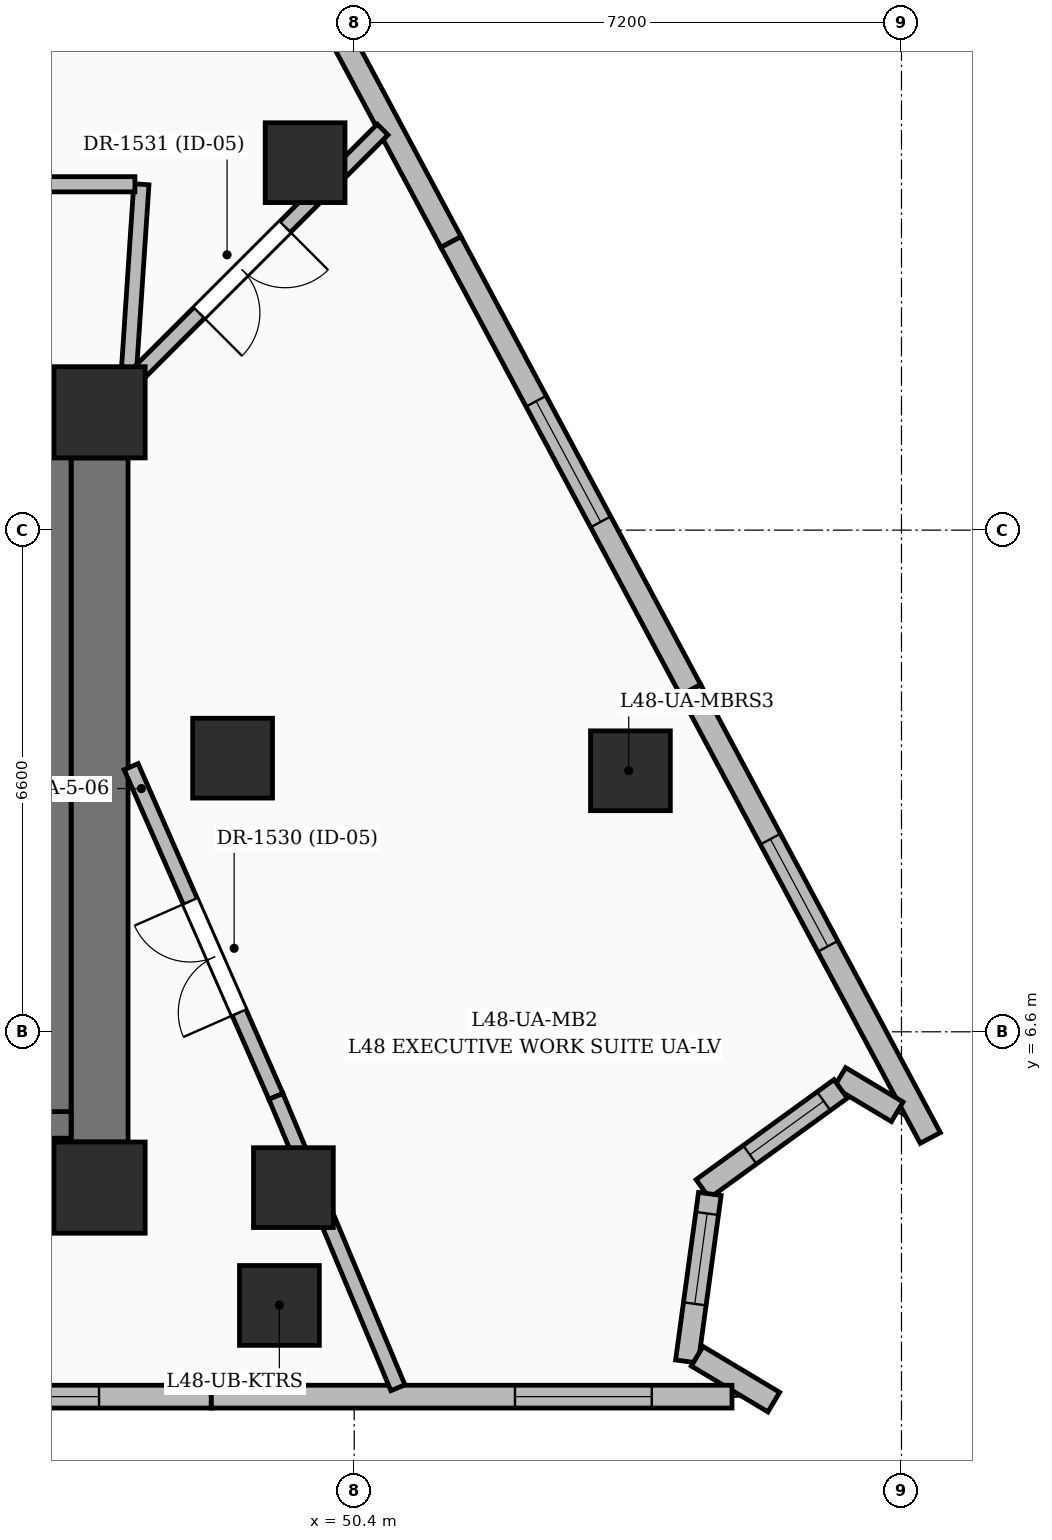
"""IFC4 building model, lengths in metres.
Left out: names, types, materials, properties, quantities, classifications, styles, units other than length and angle.
Written with IfcOpenShell. Run it as: python <this file> out.ifc"""

import sys

from ifc_helpers import new_model, si_unit, direction, frame, frame_2d, origin, origin_2d, place, context, subcontext, project, spatial, rectangle, extrude, element, fill, save


model = new_model("IFC4")
c1 = context("Model", 3, precision=1e-05, world=origin(), true_north=direction((0.0, 1.0)))
c2 = subcontext(c1, "Body", "Model", "MODEL_VIEW")
j1 = project(units=[si_unit("LENGTHUNIT", "METRE"), si_unit("PLANEANGLEUNIT", "RADIAN")], contexts=[c1])
p1 = place(None, origin())
s1 = spatial("IfcSite", under=j1, at=p1, CompositionType="ELEMENT")
p2 = place(p1, origin())
s2 = spatial("IfcBuilding", under=s1, at=p2, CompositionType="ELEMENT")
p3 = place(p2, frame((0.0, 0.0, 186.0)))
s3 = spatial("IfcBuildingStorey", under=s2, at=p3, CompositionType="ELEMENT", Elevation=186.0)
for number, where, z_axis, x_axis in (
    (1, (47.05, 4.55, 0.0), (0.0, 0.0, 1.0), (1.0, 0.0, 0.0)),
    (2, (47.05, 14.75, 0.0), (0.0, 0.0, 1.0), (1.0, 0.0, 0.0)),
):
    element("IfcColumn", number, at=place(p3, frame(where, z_axis=z_axis, x_axis=x_axis)), inside=s3, PredefinedType="COLUMN", context=c2, shape_type="SweptSolid", body=[
        extrude(rectangle(XDim=1.2, YDim=1.2, at=origin_2d()), origin(), (0.0, 0.0, 1.0), 3.6),
    ])
for number, where, z_axis, x_axis in (
    (3, (49.6, 4.55, 0.0), (0.0, 0.0, 1.0), (1.0, 0.0, 0.0)),
    (4, (48.8, 10.2, 0.0), (0.0, 0.0, 1.0), (1.0, 0.0, 0.0)),
):
    element("IfcColumn", number, at=place(p3, frame(where, z_axis=z_axis, x_axis=x_axis)), inside=s3, PredefinedType="COLUMN", context=c2, shape_type="SweptSolid", body=[
        extrude(rectangle(XDim=1.05, YDim=1.05, at=origin_2d()), origin(), (0.0, 0.0, 1.0), 3.6),
    ])
p4 = place(p3, frame((35.75, 4.55, 0.0), z_axis=(0.0, 0.0, 1.0), x_axis=(1.0, 0.0, 0.0)))
e5 = element("IfcWall", 5, at=p4, inside=s3, PredefinedType="SHEAR", context=c2, shape_type="SweptSolid", body=[
    extrude(rectangle(XDim=10.7, YDim=0.75, at=frame_2d((5.35, 0.0))), origin(), (0.0, 0.0, 1.0), 3.6),
])
p5 = place(p3, frame((35.75, 14.75, 0.0), z_axis=(0.0, 0.0, 1.0), x_axis=(1.0, 0.0, 0.0)))
e6 = element("IfcWall", 6, at=p5, inside=s3, PredefinedType="SHEAR", context=c2, shape_type="SweptSolid", body=[
    extrude(rectangle(XDim=10.7, YDim=0.75, at=frame_2d((5.35, 0.0))), origin(), (0.0, 0.0, 1.0), 3.6),
])
p6 = place(p5, frame((1.025, 0.0, 0.0)))
e7 = element("IfcOpeningElement", 7, at=p6, cuts=e6, PredefinedType="OPENING", context=c2, shape_type="SweptSolid", body=[
    extrude(rectangle(XDim=1.05, YDim=2.15, at=frame_2d((0.525, 1.075))), frame((0.0, 0.385, 0.0), z_axis=(0.0, -1.0, 0.0), x_axis=(1.0, 0.0, 0.0)), (0.0, 0.0, 1.0), 0.77),
])
p7 = place(p5, frame((8.625, 0.0, 0.0)))
e8 = element("IfcOpeningElement", 8, at=p7, cuts=e6, PredefinedType="OPENING", context=c2, shape_type="SweptSolid", body=[
    extrude(rectangle(XDim=1.05, YDim=2.15, at=frame_2d((0.525, 1.075))), frame((0.0, 0.385, 0.0), z_axis=(0.0, -1.0, 0.0), x_axis=(1.0, 0.0, 0.0)), (0.0, 0.0, 1.0), 0.77),
])
p8 = place(p3, frame((47.05, 5.15, 0.0), z_axis=(0.0, 0.0, 1.0), x_axis=(0.0, 1.0, 0.0)))
e9 = element("IfcWall", 9, at=p8, inside=s3, PredefinedType="SHEAR", context=c2, shape_type="SweptSolid", body=[
    extrude(rectangle(XDim=9.0, YDim=0.75, at=frame_2d((4.5, 0.0))), origin(), (0.0, 0.0, 1.0), 3.6),
])
p9 = place(p3, frame((46.5, 5.2, 0.0), z_axis=(0.0, 0.0, 1.0), x_axis=(0.0, 1.0, 0.0)))
e10 = element("IfcWall", 10, at=p9, inside=s3, PredefinedType="SOLIDWALL", context=c2, shape_type="SweptSolid", body=[
    extrude(rectangle(XDim=9.175, YDim=0.35, at=frame_2d((4.587, 0.0))), origin(), (0.0, 0.0, 1.0), 3.6),
])
p10 = place(p3, frame((43.125, 5.375, 0.0), z_axis=(0.0, 0.0, 1.0), x_axis=(1.0, 0.0, 0.0)))
e11 = element("IfcWall", 11, at=p10, inside=s3, PredefinedType="SOLIDWALL", context=c2, shape_type="SweptSolid", body=[
    extrude(rectangle(XDim=3.55, YDim=0.35, at=frame_2d((1.775, 0.0))), origin(), (0.0, 0.0, 1.0), 3.6),
])
for number, where, z_axis, x_axis in (
    (12, (49.416, 3.0, 0.0), (0.0, 0.0, 1.0), (1.0, 0.0, 0.0)),
    (13, (54.034, 10.034, 0.0), (0.0, 0.0, 1.0), (1.0, 0.0, 0.0)),
    (14, (49.754, 18.034, 0.0), (0.0, 0.0, 1.0), (1.0, 0.0, 0.0)),
):
    element("IfcColumn", number, at=place(p3, frame(where, z_axis=z_axis, x_axis=x_axis)), inside=s3, PredefinedType="COLUMN", context=c2, shape_type="SweptSolid", body=[
        extrude(rectangle(XDim=1.05, YDim=1.05, at=origin_2d()), origin(), (0.0, 0.0, 1.0), 3.6),
    ])
p11 = place(p3, frame((48.652, 22.636, 0.0), z_axis=(0.0, 0.0, 1.0), x_axis=(0.471747381443, -0.881733751254, 0.0)))
e15 = element("IfcWall", 15, at=p11, inside=s3, PredefinedType="SOLIDWALL", context=c2, shape_type="SweptSolid", body=[
    extrude(rectangle(XDim=6.404, YDim=0.3, at=frame_2d((3.202, 0.0))), origin(), (0.0, 0.0, 1.0), 3.35),
])
p12 = place(p11, frame((1.32, 0.0, 0.55)))
e16 = element("IfcOpeningElement", 16, at=p12, cuts=e15, PredefinedType="OPENING", context=c2, shape_type="SweptSolid", body=[
    extrude(rectangle(XDim=2.1, YDim=2.4, at=frame_2d((1.05, 1.2))), frame((0.0, 0.16, 0.0), z_axis=(0.0, -1.0, 0.0), x_axis=(1.0, 0.0, 0.0)), (0.0, 0.0, 1.0), 0.32),
])
p13 = place(p3, frame((51.673, 16.99, 0.0), z_axis=(0.0, 0.0, 1.0), x_axis=(0.471736796599, -0.881739414303, 0.0)))
e17 = element("IfcWall", 17, at=p13, inside=s3, PredefinedType="SOLIDWALL", context=c2, shape_type="SweptSolid", body=[
    extrude(rectangle(XDim=6.683, YDim=0.3, at=frame_2d((3.342, 0.0))), origin(), (0.0, 0.0, 1.0), 3.35),
])
p14 = place(p13, frame((2.375, 0.0, 0.6)))
e18 = element("IfcOpeningElement", 18, at=p14, cuts=e17, PredefinedType="OPENING", context=c2, shape_type="SweptSolid", body=[
    extrude(rectangle(XDim=1.8, YDim=2.1, at=frame_2d((0.9, 1.05))), frame((0.0, 0.16, 0.0), z_axis=(0.0, -1.0, 0.0), x_axis=(1.0, 0.0, 0.0)), (0.0, 0.0, 1.0), 0.32),
])
p15 = place(p3, frame((54.826, 11.097, 0.0), z_axis=(0.0, 0.0, 1.0), x_axis=(0.471750001728, -0.881732349338, 0.0)))
e19 = element("IfcWall", 19, at=p15, inside=s3, PredefinedType="SOLIDWALL", context=c2, shape_type="SweptSolid", body=[
    extrude(rectangle(XDim=6.684, YDim=0.3, at=frame_2d((3.342, 0.0))), origin(), (0.0, 0.0, 1.0), 3.35),
])
p16 = place(p15, frame((2.225, 0.0, 0.55)))
e20 = element("IfcOpeningElement", 20, at=p16, cuts=e19, PredefinedType="OPENING", context=c2, shape_type="SweptSolid", body=[
    extrude(rectangle(XDim=1.6, YDim=2.2, at=frame_2d((0.8, 1.1))), frame((0.0, 0.16, 0.0), z_axis=(0.0, -1.0, 0.0), x_axis=(1.0, 0.0, 0.0)), (0.0, 0.0, 1.0), 0.32),
])
p17 = place(p3, frame((57.544, 5.548, 0.0), z_axis=(0.0, 0.0, 1.0), x_axis=(-0.857957606383, 0.513720493702, 0.0)))
e21 = element("IfcWall", 21, at=p17, inside=s3, PredefinedType="SOLIDWALL", context=c2, shape_type="SweptSolid", body=[
    extrude(rectangle(XDim=0.88, YDim=0.3, at=frame_2d((0.44, 0.0))), origin(), (0.0, 0.0, 1.0), 3.35),
])
p18 = place(p3, frame((56.8, 5.849, 0.0), z_axis=(0.0, 0.0, 1.0), x_axis=(-0.809635036496, -0.586933648446, 0.0)))
e22 = element("IfcWall", 22, at=p18, inside=s3, PredefinedType="SOLIDWALL", context=c2, shape_type="SweptSolid", body=[
    extrude(rectangle(XDim=2.241, YDim=0.3, at=frame_2d((1.12, 0.0))), origin(), (0.0, 0.0, 1.0), 3.35),
])
p19 = place(p18, frame((0.275, 0.0, 0.8)))
e23 = element("IfcOpeningElement", 23, at=p19, cuts=e22, PredefinedType="OPENING", context=c2, shape_type="SweptSolid", body=[
    extrude(rectangle(XDim=1.2, YDim=1.8, at=frame_2d((0.6, 0.9))), frame((0.0, 0.16, 0.0), z_axis=(0.0, -1.0, 0.0), x_axis=(1.0, 0.0, 0.0)), (0.0, 0.0, 1.0), 0.32),
])
p20 = place(p3, frame((55.079, 4.467, 0.0), z_axis=(0.0, 0.0, 1.0), x_axis=(-0.135475439613, -0.99078070493, 0.0)))
e24 = element("IfcWall", 24, at=p20, inside=s3, PredefinedType="SOLIDWALL", context=c2, shape_type="SweptSolid", body=[
    extrude(rectangle(XDim=2.226, YDim=0.3, at=frame_2d((1.113, 0.0))), origin(), (0.0, 0.0, 1.0), 3.35),
])
p21 = place(p20, frame((0.26, 0.0, 0.8)))
e25 = element("IfcOpeningElement", 25, at=p21, cuts=e24, PredefinedType="OPENING", context=c2, shape_type="SweptSolid", body=[
    extrude(rectangle(XDim=1.2, YDim=1.8, at=frame_2d((0.6, 0.9))), frame((0.0, 0.16, 0.0), z_axis=(0.0, -1.0, 0.0), x_axis=(1.0, 0.0, 0.0)), (0.0, 0.0, 1.0), 0.32),
])
p22 = place(p3, frame((54.912, 2.332, 0.0), z_axis=(0.0, 0.0, 1.0), x_axis=(0.857950827386, -0.513731815043, 0.0)))
e26 = element("IfcWall", 26, at=p22, inside=s3, PredefinedType="SOLIDWALL", context=c2, shape_type="SweptSolid", body=[
    extrude(rectangle(XDim=1.175, YDim=0.3, at=frame_2d((0.588, 0.0))), origin(), (0.0, 0.0, 1.0), 3.35),
])
p23 = place(p3, frame((55.37, 1.8, 0.0), z_axis=(0.0, 0.0, 1.0), x_axis=(-1.0, 0.0, 0.0)))
e27 = element("IfcWall", 27, at=p23, inside=s3, PredefinedType="SOLIDWALL", context=c2, shape_type="SweptSolid", body=[
    extrude(rectangle(XDim=6.852, YDim=0.3, at=frame_2d((3.426, 0.0))), origin(), (0.0, 0.0, 1.0), 3.35),
])
p24 = place(p23, frame((1.055, 0.0, 0.6)))
e28 = element("IfcOpeningElement", 28, at=p24, cuts=e27, PredefinedType="OPENING", context=c2, shape_type="SweptSolid", body=[
    extrude(rectangle(XDim=1.8, YDim=2.1, at=frame_2d((0.9, 1.05))), frame((0.0, 0.16, 0.0), z_axis=(0.0, -1.0, 0.0), x_axis=(1.0, 0.0, 0.0)), (0.0, 0.0, 1.0), 0.32),
])
p25 = place(p3, frame((48.518, 1.8, 0.0), z_axis=(0.0, 0.0, 1.0), x_axis=(-1.0, 0.0, 0.0)))
e29 = element("IfcWall", 29, at=p25, inside=s3, PredefinedType="SOLIDWALL", context=c2, shape_type="SweptSolid", body=[
    extrude(rectangle(XDim=7.422, YDim=0.3, at=frame_2d((3.711, 0.0))), origin(), (0.0, 0.0, 1.0), 3.35),
])
p26 = place(p25, frame((4.85, 0.0, 0.55)))
e30 = element("IfcOpeningElement", 30, at=p26, cuts=e29, PredefinedType="OPENING", context=c2, shape_type="SweptSolid", body=[
    extrude(rectangle(XDim=1.6, YDim=2.2, at=frame_2d((0.8, 1.1))), frame((0.0, 0.16, 0.0), z_axis=(0.0, -1.0, 0.0), x_axis=(1.0, 0.0, 0.0)), (0.0, 0.0, 1.0), 0.32),
])
p27 = place(p25, frame((1.475, 0.0, 0.55)))
e31 = element("IfcOpeningElement", 31, at=p27, cuts=e29, PredefinedType="OPENING", context=c2, shape_type="SweptSolid", body=[
    extrude(rectangle(XDim=1.6, YDim=2.2, at=frame_2d((0.8, 1.1))), frame((0.0, 0.16, 0.0), z_axis=(0.0, -1.0, 0.0), x_axis=(1.0, 0.0, 0.0)), (0.0, 0.0, 1.0), 0.32),
])
p28 = place(p3, frame((47.437, 15.305, 0.0), z_axis=(0.0, 0.0, 1.0), x_axis=(0.066545458009, 0.997783394339, 0.0)))
e32 = element("IfcWall", 32, at=p28, inside=s3, PredefinedType="PARTITIONING", context=c2, shape_type="SweptSolid", body=[
    extrude(rectangle(XDim=2.451, YDim=0.2, at=frame_2d((1.225, 0.0))), origin(), (0.0, 0.0, 1.0), 2.464),
])
p29 = place(p3, frame((47.515, 17.75, 0.0), z_axis=(0.0, 0.0, 1.0), x_axis=(-1.0, 0.0, 0.0)))
e33 = element("IfcWall", 33, at=p29, inside=s3, PredefinedType="PARTITIONING", context=c2, shape_type="SweptSolid", body=[
    extrude(rectangle(XDim=1.725, YDim=0.2, at=frame_2d((0.862, 0.0))), origin(), (0.0, 0.0, 1.0), 2.436),
])
p30 = place(p3, frame((49.37, 5.75, 0.0), z_axis=(0.0, 0.0, 1.0), x_axis=(-0.402056440703, 0.915614885467, 0.0)))
e34 = element("IfcWall", 34, at=p30, inside=s3, PredefinedType="PARTITIONING", context=c2, shape_type="SweptSolid", body=[
    extrude(rectangle(XDim=4.738, YDim=0.2, at=frame_2d((2.369, 0.0))), origin(), (0.0, 0.0, 1.0), 2.436),
])
p31 = place(p30, frame((1.205, 0.0, 0.0)))
e35 = element("IfcOpeningElement", 35, at=p31, cuts=e34, PredefinedType="OPENING", context=c2, shape_type="SweptSolid", body=[
    extrude(rectangle(XDim=1.6, YDim=2.3, at=frame_2d((0.8, 1.15))), frame((0.0, 0.11, 0.0), z_axis=(0.0, -1.0, 0.0), x_axis=(1.0, 0.0, 0.0)), (0.0, 0.0, 1.0), 0.22),
])
p32 = place(p3, frame((50.975, 1.917, 0.0), z_axis=(0.0, 0.0, 1.0), x_axis=(-0.386233418948, 0.922401076586, 0.0)))
e36 = element("IfcWall", 36, at=p32, inside=s3, PredefinedType="PARTITIONING", context=c2, shape_type="SweptSolid", body=[
    extrude(rectangle(XDim=4.156, YDim=0.2, at=frame_2d((2.078, 0.0))), origin(), (0.0, 0.0, 1.0), 2.57),
])
p33 = place(p3, frame((50.774, 18.47, 0.0), z_axis=(0.0, 0.0, 1.0), x_axis=(-0.70755309569, -0.706660184798, 0.0)))
e37 = element("IfcWall", 37, at=p33, inside=s3, PredefinedType="PARTITIONING", context=c2, shape_type="SweptSolid", body=[
    extrude(rectangle(XDim=4.648, YDim=0.2, at=frame_2d((2.324, 0.0))), origin(), (0.0, 0.0, 1.0), 2.464),
])
p34 = place(p33, frame((1.813, 0.0, 0.0)))
e38 = element("IfcOpeningElement", 38, at=p34, cuts=e37, PredefinedType="OPENING", context=c2, shape_type="SweptSolid", body=[
    extrude(rectangle(XDim=1.6, YDim=2.3, at=frame_2d((0.8, 1.15))), frame((0.0, 0.11, 0.0), z_axis=(0.0, -1.0, 0.0), x_axis=(1.0, 0.0, 0.0)), (0.0, 0.0, 1.0), 0.22),
])
p35 = place(p14, origin())
e39 = element("IfcWindow", 39, at=p35, inside=s3, PartitioningType="SINGLE_PANEL", PredefinedType="WINDOW", context=c2, shape_type="SweptSolid", body=[
    extrude(rectangle(XDim=1.8, YDim=2.1, at=frame_2d((0.9, 1.05))), frame((0.0, 0.03, 0.0), z_axis=(0.0, -1.0, 0.0), x_axis=(1.0, 0.0, 0.0)), (0.0, 0.0, 1.0), 0.06),
])
fill(e18, e39)
p36 = place(p16, origin())
e40 = element("IfcWindow", 40, at=p36, inside=s3, PartitioningType="SINGLE_PANEL", PredefinedType="WINDOW", context=c2, shape_type="SweptSolid", body=[
    extrude(rectangle(XDim=1.6, YDim=2.2, at=frame_2d((0.8, 1.1))), frame((0.0, 0.03, 0.0), z_axis=(0.0, -1.0, 0.0), x_axis=(1.0, 0.0, 0.0)), (0.0, 0.0, 1.0), 0.06),
])
fill(e20, e40)
p37 = place(p19, origin())
e41 = element("IfcWindow", 41, at=p37, inside=s3, PartitioningType="SINGLE_PANEL", PredefinedType="WINDOW", context=c2, shape_type="SweptSolid", body=[
    extrude(rectangle(XDim=1.2, YDim=1.8, at=frame_2d((0.6, 0.9))), frame((0.0, 0.03, 0.0), z_axis=(0.0, -1.0, 0.0), x_axis=(1.0, 0.0, 0.0)), (0.0, 0.0, 1.0), 0.06),
])
fill(e23, e41)
p38 = place(p21, origin())
e42 = element("IfcWindow", 42, at=p38, inside=s3, PartitioningType="SINGLE_PANEL", PredefinedType="WINDOW", context=c2, shape_type="SweptSolid", body=[
    extrude(rectangle(XDim=1.2, YDim=1.8, at=frame_2d((0.6, 0.9))), frame((0.0, 0.03, 0.0), z_axis=(0.0, -1.0, 0.0), x_axis=(1.0, 0.0, 0.0)), (0.0, 0.0, 1.0), 0.06),
])
fill(e25, e42)
p39 = place(p24, origin())
e43 = element("IfcWindow", 43, at=p39, inside=s3, PartitioningType="SINGLE_PANEL", PredefinedType="WINDOW", context=c2, shape_type="SweptSolid", body=[
    extrude(rectangle(XDim=1.8, YDim=2.1, at=frame_2d((0.9, 1.05))), frame((0.0, 0.03, 0.0), z_axis=(0.0, -1.0, 0.0), x_axis=(1.0, 0.0, 0.0)), (0.0, 0.0, 1.0), 0.06),
])
fill(e28, e43)
p40 = place(p27, origin())
e44 = element("IfcWindow", 44, at=p40, inside=s3, PartitioningType="SINGLE_PANEL", PredefinedType="WINDOW", context=c2, shape_type="SweptSolid", body=[
    extrude(rectangle(XDim=1.6, YDim=2.2, at=frame_2d((0.8, 1.1))), frame((0.0, 0.03, 0.0), z_axis=(0.0, -1.0, 0.0), x_axis=(1.0, 0.0, 0.0)), (0.0, 0.0, 1.0), 0.06),
])
fill(e31, e44)
p41 = place(p31, origin())
e45 = element("IfcDoor", 45, at=p41, inside=s3, OperationType="DOUBLE_DOOR_SINGLE_SWING", PredefinedType="DOOR", context=c2, shape_type="SweptSolid", body=[
    extrude(rectangle(XDim=1.6, YDim=2.3, at=frame_2d((0.8, 1.15))), frame((0.0, 0.025, 0.0), z_axis=(0.0, -1.0, 0.0), x_axis=(1.0, 0.0, 0.0)), (0.0, 0.0, 1.0), 0.05),
])
fill(e35, e45)
p42 = place(p34, origin())
e46 = element("IfcDoor", 46, at=p42, inside=s3, OperationType="DOUBLE_DOOR_SINGLE_SWING", PredefinedType="DOOR", context=c2, shape_type="SweptSolid", body=[
    extrude(rectangle(XDim=1.6, YDim=2.3, at=frame_2d((0.8, 1.15))), frame((0.0, 0.025, 0.0), z_axis=(0.0, -1.0, 0.0), x_axis=(1.0, 0.0, 0.0)), (0.0, 0.0, 1.0), 0.05),
])
fill(e38, e46)
save(model, sys.argv[1])
